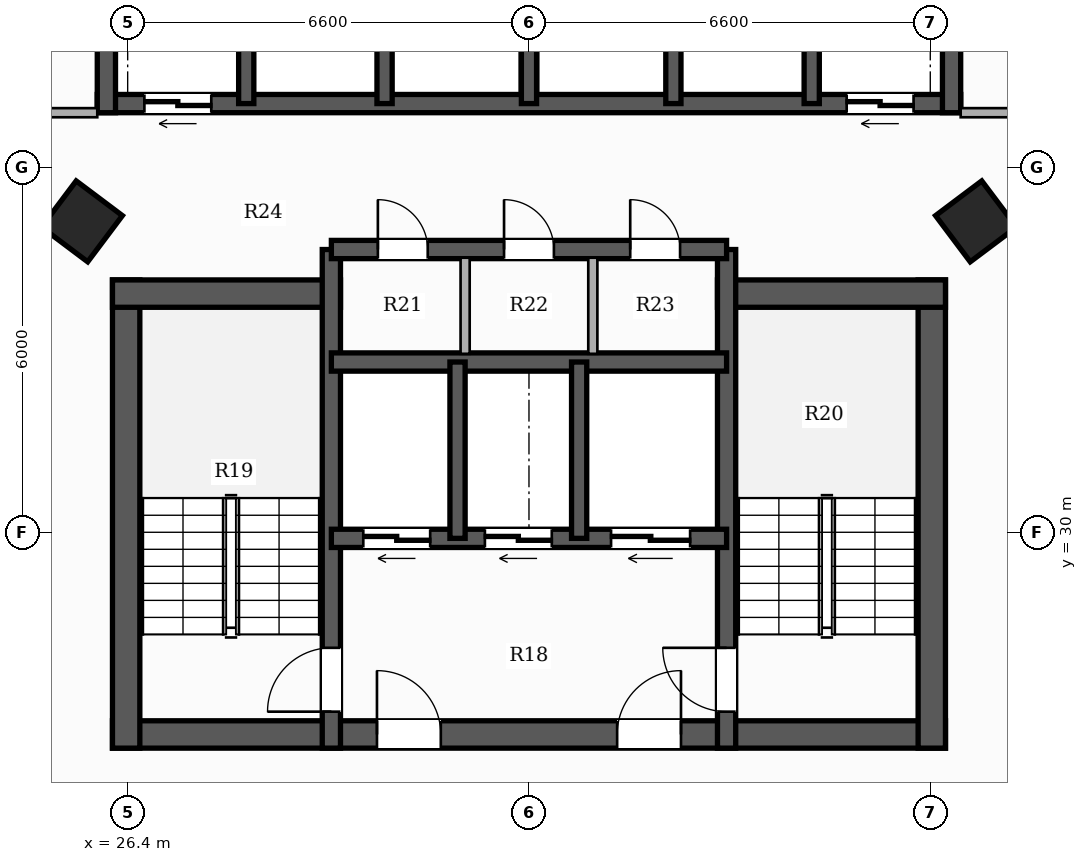
"""IFC4 building model, lengths in metres.
Left out: names, types, materials, properties, quantities, classifications, styles, units other than length and angle.
Written with IfcOpenShell. Run it as: python <this file> out.ifc"""

import sys

from ifc_helpers import new_model, si_unit, direction, frame, frame_2d, origin, origin_2d, place, context, subcontext, project, spatial, rectangle, hollow_rectangle, extrude, element, fill, save


model = new_model("IFC4")
c1 = context("Model", 3, precision=1e-05, world=origin(), true_north=direction((0.0, 1.0)))
c2 = subcontext(c1, "Body", "Model", "MODEL_VIEW")
j1 = project(units=[si_unit("LENGTHUNIT", "METRE"), si_unit("PLANEANGLEUNIT", "RADIAN")], contexts=[c1])
p1 = place(None, origin())
s1 = spatial("IfcSite", under=j1, at=p1, CompositionType="ELEMENT")
p2 = place(p1, origin())
s2 = spatial("IfcBuilding", under=s1, at=p2, CompositionType="ELEMENT")
p3 = place(p2, frame((0.0, 0.0, 93.95)))
s3 = spatial("IfcBuildingStorey", under=s2, at=p3, CompositionType="ELEMENT", Elevation=93.95)
p4 = place(p3, frame((26.15, 26.675, 0.0), z_axis=(0.0, 0.0, 1.0), x_axis=(1.0, 0.0, 0.0)))
e1 = element("IfcWall", 1, at=p4, inside=s3, PredefinedType="SHEAR", context=c2, shape_type="SweptSolid", body=[
    extrude(rectangle(XDim=13.7, YDim=0.45, at=frame_2d((6.85, 0.0))), origin(), (0.0, 0.0, 1.0), 3.3),
])
p5 = place(p4, frame((4.35, 0.0, 0.0)))
e2 = element("IfcOpeningElement", 2, at=p5, cuts=e1, PredefinedType="OPENING", context=c2, shape_type="SweptSolid", body=[
    extrude(rectangle(XDim=1.05, YDim=2.15, at=frame_2d((0.525, 1.075))), frame((0.0, 0.235, 0.0), z_axis=(0.0, -1.0, 0.0), x_axis=(1.0, 0.0, 0.0)), (0.0, 0.0, 1.0), 0.47),
])
p6 = place(p4, frame((8.3, 0.0, 0.0)))
e3 = element("IfcOpeningElement", 3, at=p6, cuts=e1, PredefinedType="OPENING", context=c2, shape_type="SweptSolid", body=[
    extrude(rectangle(XDim=1.05, YDim=2.15, at=frame_2d((0.525, 1.075))), frame((0.0, 0.235, 0.0), z_axis=(0.0, -1.0, 0.0), x_axis=(1.0, 0.0, 0.0)), (0.0, 0.0, 1.0), 0.47),
])
p7 = place(p3, frame((26.375, 26.45, 0.0), z_axis=(0.0, 0.0, 1.0), x_axis=(0.0, 1.0, 0.0)))
e4 = element("IfcWall", 4, at=p7, inside=s3, PredefinedType="SHEAR", context=c2, shape_type="SweptSolid", body=[
    extrude(rectangle(XDim=7.7, YDim=0.45, at=frame_2d((3.85, 0.0))), origin(), (0.0, 0.0, 1.0), 3.3),
])
p8 = place(p3, frame((26.15, 33.925, 0.0), z_axis=(0.0, 0.0, 1.0), x_axis=(1.0, 0.0, 0.0)))
e5 = element("IfcWall", 5, at=p8, inside=s3, PredefinedType="SHEAR", context=c2, shape_type="SweptSolid", body=[
    extrude(rectangle(XDim=3.75, YDim=0.45, at=frame_2d((1.875, 0.0))), origin(), (0.0, 0.0, 1.0), 3.3),
])
p9 = place(p3, frame((39.625, 26.45, 0.0), z_axis=(0.0, 0.0, 1.0), x_axis=(0.0, 1.0, 0.0)))
e6 = element("IfcWall", 6, at=p9, inside=s3, PredefinedType="SHEAR", context=c2, shape_type="SweptSolid", body=[
    extrude(rectangle(XDim=7.7, YDim=0.45, at=frame_2d((3.85, 0.0))), origin(), (0.0, 0.0, 1.0), 3.3),
])
p10 = place(p3, frame((36.1, 33.925, 0.0), z_axis=(0.0, 0.0, 1.0), x_axis=(1.0, 0.0, 0.0)))
e7 = element("IfcWall", 7, at=p10, inside=s3, PredefinedType="SHEAR", context=c2, shape_type="SweptSolid", body=[
    extrude(rectangle(XDim=3.75, YDim=0.45, at=frame_2d((1.875, 0.0))), origin(), (0.0, 0.0, 1.0), 3.3),
])
p11 = place(p3, frame((29.75, 26.45, 0.0), z_axis=(0.0, 0.0, 1.0), x_axis=(0.0, 1.0, 0.0)))
e8 = element("IfcWall", 8, at=p11, inside=s3, PredefinedType="SHEAR", context=c2, shape_type="SweptSolid", body=[
    extrude(rectangle(XDim=8.2, YDim=0.3, at=frame_2d((4.1, 0.0))), origin(), (0.0, 0.0, 1.0), 3.3),
])
p12 = place(p11, frame((0.6, 0.0, 0.0)))
e9 = element("IfcOpeningElement", 9, at=p12, cuts=e8, PredefinedType="OPENING", context=c2, shape_type="SweptSolid", body=[
    extrude(rectangle(XDim=1.05, YDim=2.15, at=frame_2d((0.525, 1.075))), frame((0.0, 0.16, 0.0), z_axis=(0.0, -1.0, 0.0), x_axis=(1.0, 0.0, 0.0)), (0.0, 0.0, 1.0), 0.32),
])
p13 = place(p3, frame((36.25, 26.45, 0.0), z_axis=(0.0, 0.0, 1.0), x_axis=(0.0, 1.0, 0.0)))
e10 = element("IfcWall", 10, at=p13, inside=s3, PredefinedType="SHEAR", context=c2, shape_type="SweptSolid", body=[
    extrude(rectangle(XDim=8.2, YDim=0.3, at=frame_2d((4.1, 0.0))), origin(), (0.0, 0.0, 1.0), 3.3),
])
p14 = place(p13, frame((0.6, 0.0, 0.0)))
e11 = element("IfcOpeningElement", 11, at=p14, cuts=e10, PredefinedType="OPENING", context=c2, shape_type="SweptSolid", body=[
    extrude(rectangle(XDim=1.05, YDim=2.15, at=frame_2d((0.525, 1.075))), frame((0.0, 0.16, 0.0), z_axis=(0.0, -1.0, 0.0), x_axis=(1.0, 0.0, 0.0)), (0.0, 0.0, 1.0), 0.32),
])
p15 = place(p3, frame((36.25, 29.9, 0.0), z_axis=(0.0, 0.0, 1.0), x_axis=(-1.0, 0.0, 0.0)))
e12 = element("IfcWall", 12, at=p15, inside=s3, PredefinedType="SHEAR", context=c2, shape_type="SweptSolid", body=[
    extrude(rectangle(XDim=6.5, YDim=0.3, at=frame_2d((3.25, 0.0))), origin(), (0.0, 0.0, 1.0), 3.3),
])
p16 = place(p15, frame((4.875, 0.0, 0.0)))
e13 = element("IfcOpeningElement", 13, at=p16, cuts=e12, PredefinedType="OPENING", context=c2, shape_type="SweptSolid", body=[
    extrude(rectangle(XDim=1.1, YDim=2.2, at=frame_2d((0.55, 1.1))), frame((0.0, 0.16, 0.0), z_axis=(0.0, -1.0, 0.0), x_axis=(1.0, 0.0, 0.0)), (0.0, 0.0, 1.0), 0.32),
])
p17 = place(p15, frame((2.875, 0.0, 0.0)))
e14 = element("IfcOpeningElement", 14, at=p17, cuts=e12, PredefinedType="OPENING", context=c2, shape_type="SweptSolid", body=[
    extrude(rectangle(XDim=1.1, YDim=2.2, at=frame_2d((0.55, 1.1))), frame((0.0, 0.16, 0.0), z_axis=(0.0, -1.0, 0.0), x_axis=(1.0, 0.0, 0.0)), (0.0, 0.0, 1.0), 0.32),
])
p18 = place(p15, frame((0.6, 0.0, 0.0)))
e15 = element("IfcOpeningElement", 15, at=p18, cuts=e12, PredefinedType="OPENING", context=c2, shape_type="SweptSolid", body=[
    extrude(rectangle(XDim=1.3, YDim=2.2, at=frame_2d((0.65, 1.1))), frame((0.0, 0.16, 0.0), z_axis=(0.0, -1.0, 0.0), x_axis=(1.0, 0.0, 0.0)), (0.0, 0.0, 1.0), 0.32),
])
p19 = place(p3, frame((29.75, 32.8, 0.0), z_axis=(0.0, 0.0, 1.0), x_axis=(1.0, 0.0, 0.0)))
e16 = element("IfcWall", 16, at=p19, inside=s3, PredefinedType="SHEAR", context=c2, shape_type="SweptSolid", body=[
    extrude(rectangle(XDim=6.5, YDim=0.3, at=frame_2d((3.25, 0.0))), origin(), (0.0, 0.0, 1.0), 3.3),
])
for number, where, z_axis, x_axis in (
    (17, (31.825, 29.9, 0.0), (0.0, 0.0, 1.0), (0.0, 1.0, 0.0)),
    (18, (33.825, 29.9, 0.0), (0.0, 0.0, 1.0), (0.0, 1.0, 0.0)),
):
    element("IfcWall", number, at=place(p3, frame(where, z_axis=z_axis, x_axis=x_axis)), inside=s3, PredefinedType="SHEAR", context=c2, shape_type="SweptSolid", body=[
        extrude(rectangle(XDim=2.9, YDim=0.25, at=frame_2d((1.45, 0.0))), origin(), (0.0, 0.0, 1.0), 3.3),
    ])
p20 = place(p3, frame((29.75, 34.65, 0.0), z_axis=(0.0, 0.0, 1.0), x_axis=(1.0, 0.0, 0.0)))
e19 = element("IfcWall", 19, at=p20, inside=s3, PredefinedType="SHEAR", context=c2, shape_type="SweptSolid", body=[
    extrude(rectangle(XDim=6.5, YDim=0.3, at=frame_2d((3.25, 0.0))), origin(), (0.0, 0.0, 1.0), 3.3),
])
p21 = place(p20, frame((0.765, 0.0, 0.0)))
e20 = element("IfcOpeningElement", 20, at=p21, cuts=e19, PredefinedType="OPENING", context=c2, shape_type="SweptSolid", body=[
    extrude(rectangle(XDim=0.82, YDim=2.1, at=frame_2d((0.41, 1.05))), frame((0.0, 0.16, 0.0), z_axis=(0.0, -1.0, 0.0), x_axis=(1.0, 0.0, 0.0)), (0.0, 0.0, 1.0), 0.32),
])
p22 = place(p20, frame((2.84, 0.0, 0.0)))
e21 = element("IfcOpeningElement", 21, at=p22, cuts=e19, PredefinedType="OPENING", context=c2, shape_type="SweptSolid", body=[
    extrude(rectangle(XDim=0.82, YDim=2.1, at=frame_2d((0.41, 1.05))), frame((0.0, 0.16, 0.0), z_axis=(0.0, -1.0, 0.0), x_axis=(1.0, 0.0, 0.0)), (0.0, 0.0, 1.0), 0.32),
])
p23 = place(p20, frame((4.915, 0.0, 0.0)))
e22 = element("IfcOpeningElement", 22, at=p23, cuts=e19, PredefinedType="OPENING", context=c2, shape_type="SweptSolid", body=[
    extrude(rectangle(XDim=0.82, YDim=2.1, at=frame_2d((0.41, 1.05))), frame((0.0, 0.16, 0.0), z_axis=(0.0, -1.0, 0.0), x_axis=(1.0, 0.0, 0.0)), (0.0, 0.0, 1.0), 0.32),
])
p24 = place(p3, frame((40.1, 37.05, 0.0), z_axis=(0.0, 0.0, 1.0), x_axis=(-1.0, 0.0, 0.0)))
e23 = element("IfcWall", 23, at=p24, inside=s3, PredefinedType="SHEAR", context=c2, shape_type="SweptSolid", body=[
    extrude(rectangle(XDim=14.2, YDim=0.3, at=frame_2d((7.1, 0.0))), origin(), (0.0, 0.0, 1.0), 3.3),
])
p25 = place(p24, frame((12.325, 0.0, 0.0)))
e24 = element("IfcOpeningElement", 24, at=p25, cuts=e23, PredefinedType="OPENING", context=c2, shape_type="SweptSolid", body=[
    extrude(rectangle(XDim=1.1, YDim=2.2, at=frame_2d((0.55, 1.1))), frame((0.0, 0.16, 0.0), z_axis=(0.0, -1.0, 0.0), x_axis=(1.0, 0.0, 0.0)), (0.0, 0.0, 1.0), 0.32),
])
p26 = place(p24, frame((0.775, 0.0, 0.0)))
e25 = element("IfcOpeningElement", 25, at=p26, cuts=e23, PredefinedType="OPENING", context=c2, shape_type="SweptSolid", body=[
    extrude(rectangle(XDim=1.1, YDim=2.2, at=frame_2d((0.55, 1.1))), frame((0.0, 0.16, 0.0), z_axis=(0.0, -1.0, 0.0), x_axis=(1.0, 0.0, 0.0)), (0.0, 0.0, 1.0), 0.32),
])
for number, where, z_axis, x_axis in (
    (26, (26.05, 36.9, 0.0), (0.0, 0.0, 1.0), (0.0, 1.0, 0.0)),
    (27, (39.95, 36.9, 0.0), (0.0, 0.0, 1.0), (0.0, 1.0, 0.0)),
):
    element("IfcWall", number, at=place(p3, frame(where, z_axis=z_axis, x_axis=x_axis)), inside=s3, PredefinedType="SHEAR", context=c2, shape_type="SweptSolid", body=[
        extrude(rectangle(XDim=2.85, YDim=0.3, at=frame_2d((1.425, 0.0))), origin(), (0.0, 0.0, 1.0), 3.3),
    ])
for number, where, z_axis, x_axis in (
    (28, (28.35, 37.05, 0.0), (0.0, 0.0, 1.0), (0.0, 1.0, 0.0)),
    (29, (30.625, 37.05, 0.0), (0.0, 0.0, 1.0), (0.0, 1.0, 0.0)),
    (30, (33.0, 37.05, 0.0), (0.0, 0.0, 1.0), (0.0, 1.0, 0.0)),
    (31, (35.375, 37.05, 0.0), (0.0, 0.0, 1.0), (0.0, 1.0, 0.0)),
    (32, (37.65, 37.05, 0.0), (0.0, 0.0, 1.0), (0.0, 1.0, 0.0)),
):
    element("IfcWall", number, at=place(p3, frame(where, z_axis=z_axis, x_axis=x_axis)), inside=s3, PredefinedType="SHEAR", context=c2, shape_type="SweptSolid", body=[
        extrude(rectangle(XDim=2.55, YDim=0.25, at=frame_2d((1.275, 0.0))), origin(), (0.0, 0.0, 1.0), 3.3),
    ])
for number, where, z_axis, x_axis in (
    (33, (25.648, 35.113, 0.0), (0.0, 0.0, 1.0), (0.6, 0.8, 0.0)),
    (34, (40.352, 35.113, 0.0), (0.0, 0.0, 1.0), (-0.6, 0.8, 0.0)),
):
    element("IfcColumn", number, at=place(p3, frame(where, z_axis=z_axis, x_axis=x_axis)), inside=s3, PredefinedType="COLUMN", context=c2, shape_type="SweptSolid", body=[
        extrude(hollow_rectangle(XDim=0.95, YDim=0.95, WallThickness=0.032, at=origin_2d()), origin(), (0.0, 0.0, 1.0), 3.3),
    ])
for number, where, z_axis, x_axis in (
    (35, (31.95, 32.935, 0.0), (0.0, 0.0, 1.0), (0.0, 1.0, 0.0)),
    (36, (34.05, 32.935, 0.0), (0.0, 0.0, 1.0), (0.0, 1.0, 0.0)),
):
    element("IfcWall", number, at=place(p3, frame(where, z_axis=z_axis, x_axis=x_axis)), inside=s3, PredefinedType="PARTITIONING", context=c2, shape_type="SweptSolid", body=[
        extrude(rectangle(XDim=1.58, YDim=0.15, at=frame_2d((0.79, 0.0))), origin(), (0.0, 0.0, 1.0), 3.02),
    ])
p27 = place(p3, frame((40.1, 36.9, 0.0), z_axis=(0.0, 0.0, 1.0), x_axis=(1.0, 0.0, 0.0)))
e37 = element("IfcWall", 37, at=p27, inside=s3, PredefinedType="PARTITIONING", context=c2, shape_type="SweptSolid", body=[
    extrude(rectangle(XDim=2.55, YDim=0.15, at=frame_2d((1.275, 0.0))), origin(), (0.0, 0.0, 1.0), 2.373),
])
p28 = place(p3, frame((23.41, 36.9, 0.0), z_axis=(0.0, 0.0, 1.0), x_axis=(1.0, 0.0, 0.0)))
e38 = element("IfcWall", 38, at=p28, inside=s3, PredefinedType="PARTITIONING", context=c2, shape_type="SweptSolid", body=[
    extrude(rectangle(XDim=2.49, YDim=0.15, at=frame_2d((1.245, 0.0))), origin(), (0.0, 0.0, 1.0), 2.373),
])
p29 = place(p12, origin())
e39 = element("IfcDoor", 39, at=p29, inside=s3, OperationType="SINGLE_SWING_LEFT", PredefinedType="DOOR", context=c2, shape_type="SweptSolid", body=[
    extrude(rectangle(XDim=1.05, YDim=2.15, at=frame_2d((0.525, 1.075))), frame((0.0, 0.025, 0.0), z_axis=(0.0, -1.0, 0.0), x_axis=(1.0, 0.0, 0.0)), (0.0, 0.0, 1.0), 0.05),
])
fill(e9, e39)
p30 = place(p14, origin())
e40 = element("IfcDoor", 40, at=p30, inside=s3, OperationType="SINGLE_SWING_RIGHT", PredefinedType="DOOR", context=c2, shape_type="SweptSolid", body=[
    extrude(rectangle(XDim=1.05, YDim=2.15, at=frame_2d((0.525, 1.075))), frame((0.0, 0.025, 0.0), z_axis=(0.0, -1.0, 0.0), x_axis=(1.0, 0.0, 0.0)), (0.0, 0.0, 1.0), 0.05),
])
fill(e11, e40)
p31 = place(p5, origin())
e41 = element("IfcDoor", 41, at=p31, inside=s3, OperationType="SINGLE_SWING_LEFT", PredefinedType="DOOR", context=c2, shape_type="SweptSolid", body=[
    extrude(rectangle(XDim=1.05, YDim=2.15, at=frame_2d((0.525, 1.075))), frame((0.0, 0.025, 0.0), z_axis=(0.0, -1.0, 0.0), x_axis=(1.0, 0.0, 0.0)), (0.0, 0.0, 1.0), 0.05),
])
fill(e2, e41)
p32 = place(p6, origin())
e42 = element("IfcDoor", 42, at=p32, inside=s3, OperationType="SINGLE_SWING_RIGHT", PredefinedType="DOOR", context=c2, shape_type="SweptSolid", body=[
    extrude(rectangle(XDim=1.05, YDim=2.15, at=frame_2d((0.525, 1.075))), frame((0.0, 0.025, 0.0), z_axis=(0.0, -1.0, 0.0), x_axis=(1.0, 0.0, 0.0)), (0.0, 0.0, 1.0), 0.05),
])
fill(e3, e42)
p33 = place(p16, origin())
e43 = element("IfcDoor", 43, at=p33, inside=s3, OperationType="DOUBLE_DOOR_SLIDING", PredefinedType="DOOR", context=c2, shape_type="SweptSolid", body=[
    extrude(rectangle(XDim=1.1, YDim=2.2, at=frame_2d((0.55, 1.1))), frame((0.0, 0.025, 0.0), z_axis=(0.0, -1.0, 0.0), x_axis=(1.0, 0.0, 0.0)), (0.0, 0.0, 1.0), 0.05),
])
fill(e13, e43)
p34 = place(p17, origin())
e44 = element("IfcDoor", 44, at=p34, inside=s3, OperationType="DOUBLE_DOOR_SLIDING", PredefinedType="DOOR", context=c2, shape_type="SweptSolid", body=[
    extrude(rectangle(XDim=1.1, YDim=2.2, at=frame_2d((0.55, 1.1))), frame((0.0, 0.025, 0.0), z_axis=(0.0, -1.0, 0.0), x_axis=(1.0, 0.0, 0.0)), (0.0, 0.0, 1.0), 0.05),
])
fill(e14, e44)
p35 = place(p18, origin())
e45 = element("IfcDoor", 45, at=p35, inside=s3, OperationType="DOUBLE_DOOR_SLIDING", PredefinedType="DOOR", context=c2, shape_type="SweptSolid", body=[
    extrude(rectangle(XDim=1.3, YDim=2.2, at=frame_2d((0.65, 1.1))), frame((0.0, 0.025, 0.0), z_axis=(0.0, -1.0, 0.0), x_axis=(1.0, 0.0, 0.0)), (0.0, 0.0, 1.0), 0.05),
])
fill(e15, e45)
p36 = place(p25, origin())
e46 = element("IfcDoor", 46, at=p36, inside=s3, OperationType="DOUBLE_DOOR_SLIDING", PredefinedType="DOOR", context=c2, shape_type="SweptSolid", body=[
    extrude(rectangle(XDim=1.1, YDim=2.2, at=frame_2d((0.55, 1.1))), frame((0.0, 0.025, 0.0), z_axis=(0.0, -1.0, 0.0), x_axis=(1.0, 0.0, 0.0)), (0.0, 0.0, 1.0), 0.05),
])
fill(e24, e46)
p37 = place(p26, origin())
e47 = element("IfcDoor", 47, at=p37, inside=s3, OperationType="DOUBLE_DOOR_SLIDING", PredefinedType="DOOR", context=c2, shape_type="SweptSolid", body=[
    extrude(rectangle(XDim=1.1, YDim=2.2, at=frame_2d((0.55, 1.1))), frame((0.0, 0.025, 0.0), z_axis=(0.0, -1.0, 0.0), x_axis=(1.0, 0.0, 0.0)), (0.0, 0.0, 1.0), 0.05),
])
fill(e25, e47)
p38 = place(p21, origin())
e48 = element("IfcDoor", 48, at=p38, inside=s3, OperationType="SINGLE_SWING_LEFT", PredefinedType="DOOR", context=c2, shape_type="SweptSolid", body=[
    extrude(rectangle(XDim=0.82, YDim=2.1, at=frame_2d((0.41, 1.05))), frame((0.0, 0.025, 0.0), z_axis=(0.0, -1.0, 0.0), x_axis=(1.0, 0.0, 0.0)), (0.0, 0.0, 1.0), 0.05),
])
fill(e20, e48)
p39 = place(p22, origin())
e49 = element("IfcDoor", 49, at=p39, inside=s3, OperationType="SINGLE_SWING_LEFT", PredefinedType="DOOR", context=c2, shape_type="SweptSolid", body=[
    extrude(rectangle(XDim=0.82, YDim=2.1, at=frame_2d((0.41, 1.05))), frame((0.0, 0.025, 0.0), z_axis=(0.0, -1.0, 0.0), x_axis=(1.0, 0.0, 0.0)), (0.0, 0.0, 1.0), 0.05),
])
fill(e21, e49)
p40 = place(p23, origin())
e50 = element("IfcDoor", 50, at=p40, inside=s3, OperationType="SINGLE_SWING_LEFT", PredefinedType="DOOR", context=c2, shape_type="SweptSolid", body=[
    extrude(rectangle(XDim=0.82, YDim=2.1, at=frame_2d((0.41, 1.05))), frame((0.0, 0.025, 0.0), z_axis=(0.0, -1.0, 0.0), x_axis=(1.0, 0.0, 0.0)), (0.0, 0.0, 1.0), 0.05),
])
fill(e22, e50)
save(model, sys.argv[1])
